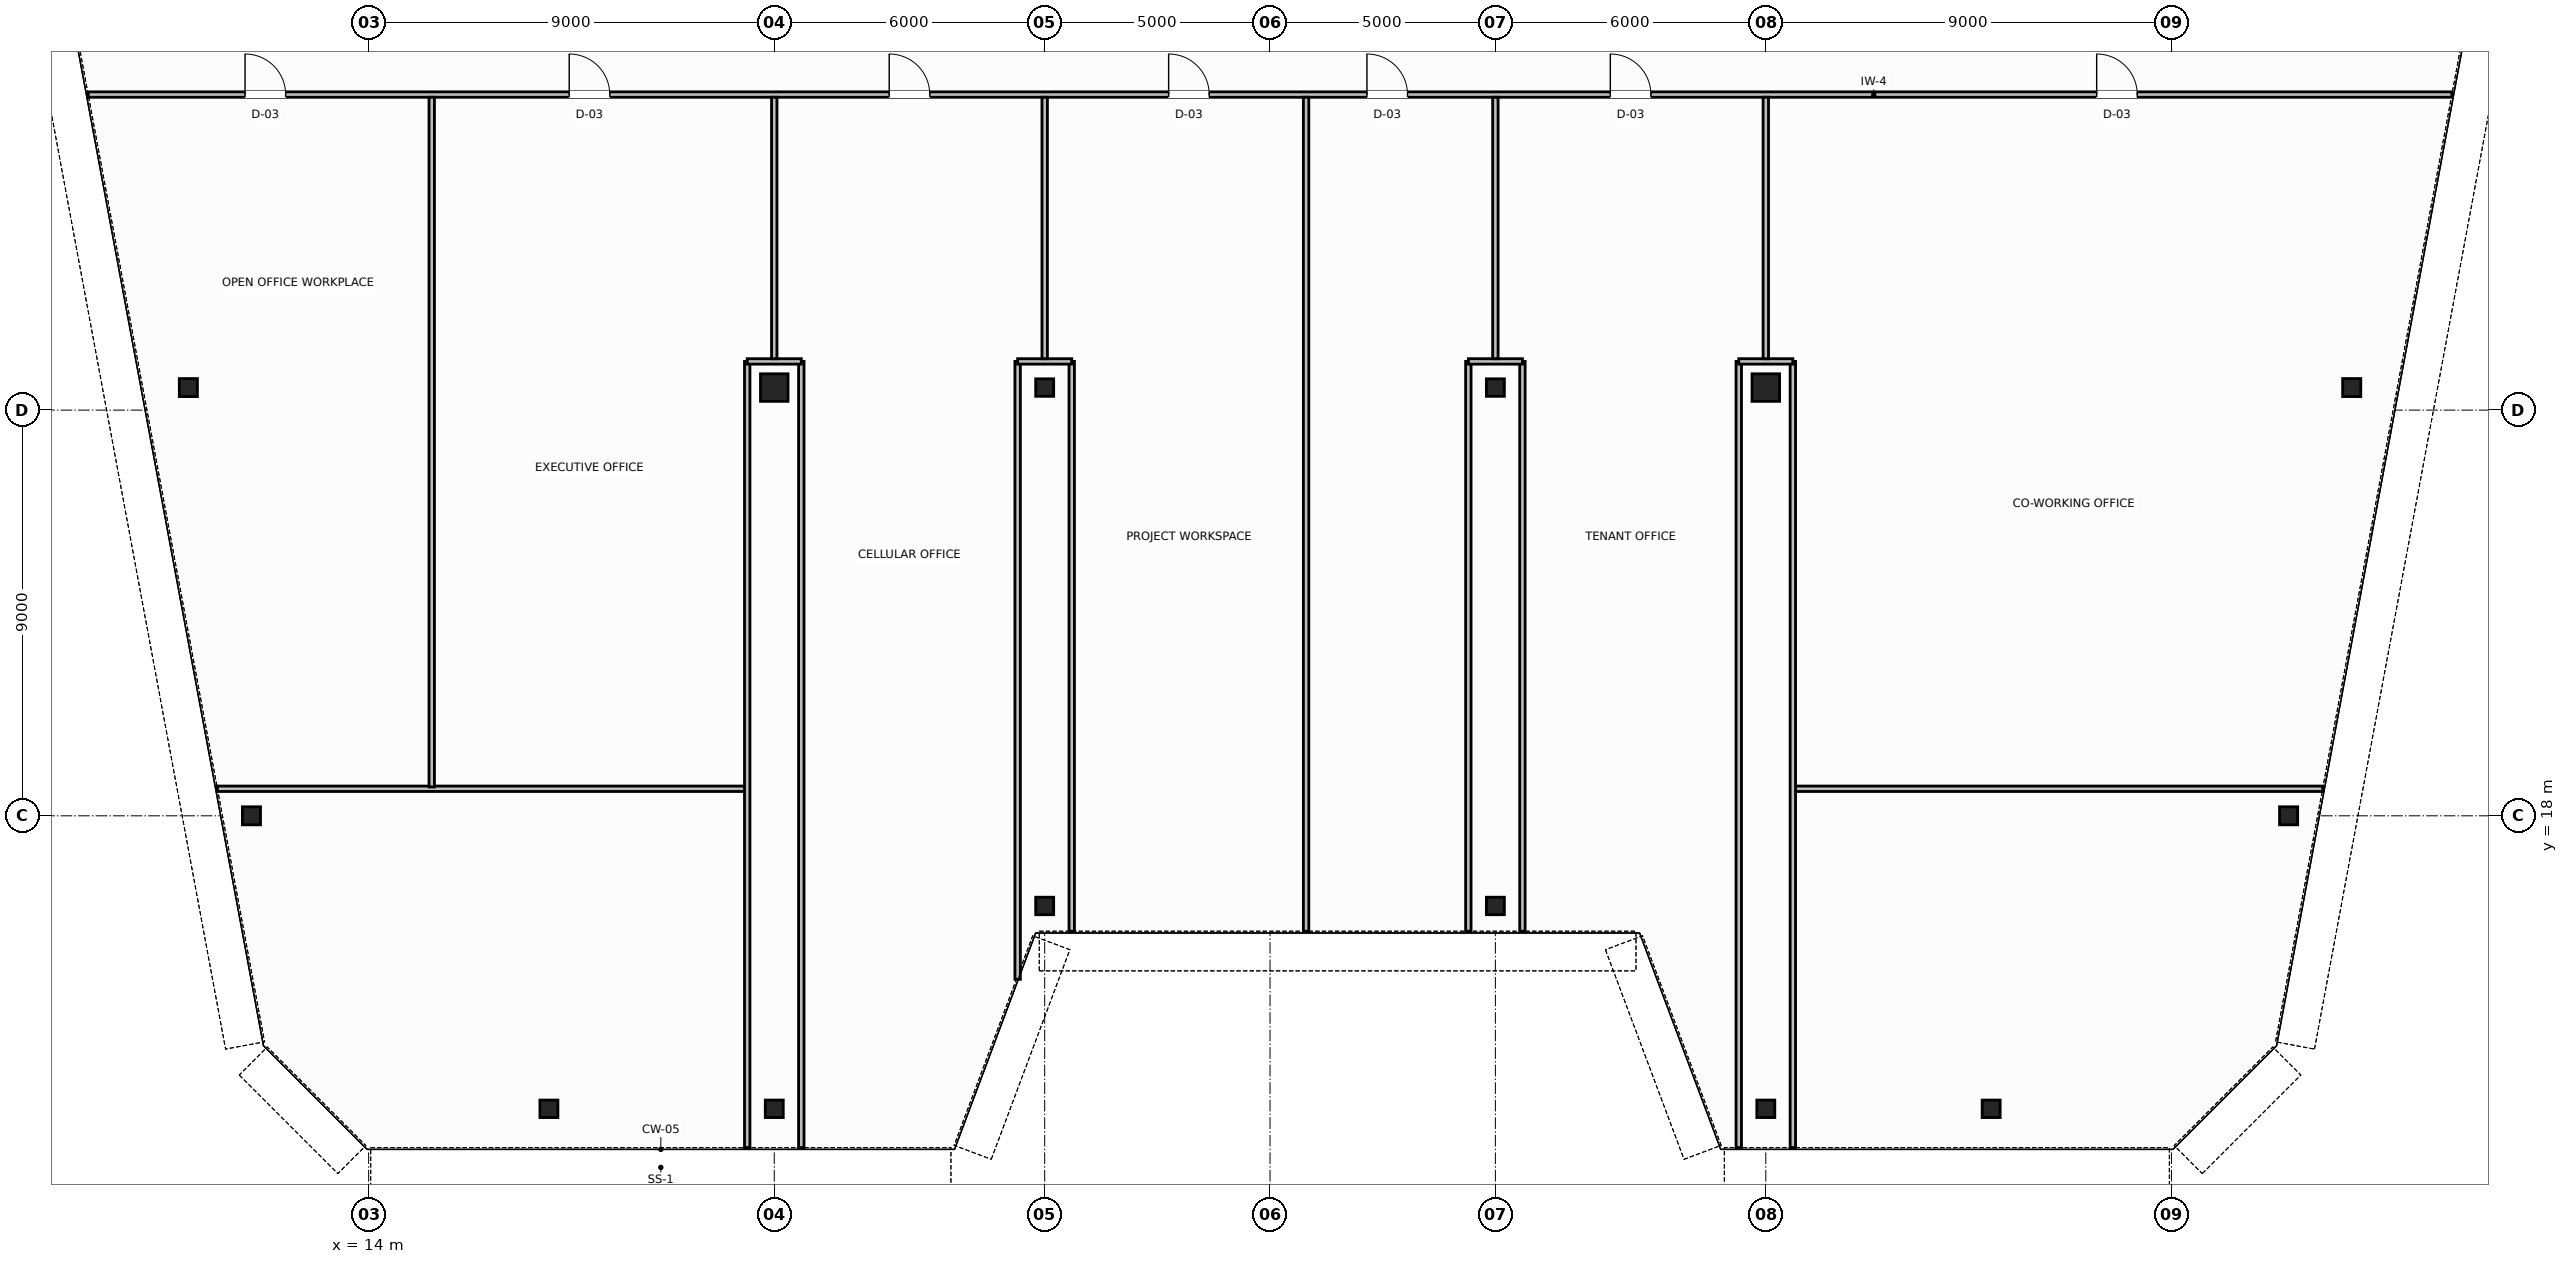
"""IFC4 building model, lengths in metres.
Left out: names, types, materials, properties, quantities, classifications, styles, units other than length and angle.
Written with IfcOpenShell. Run it as: python <this file> out.ifc"""

import sys

from ifc_helpers import new_model, si_unit, direction, frame, frame_2d, origin, origin_2d, place, context, subcontext, project, spatial, rectangle, hollow_circle, i_section, extrude, source, transform, mapped, element, fill, save


model = new_model("IFC4")
c1 = context("Model", 3, precision=1e-05, world=origin(), true_north=direction((0.0, 1.0)))
c2 = subcontext(c1, "Body", "Model", "MODEL_VIEW")
j1 = project(units=[si_unit("LENGTHUNIT", "METRE"), si_unit("PLANEANGLEUNIT", "RADIAN")], contexts=[c1])
p1 = place(None, origin())
s1 = spatial("IfcSite", under=j1, at=p1, CompositionType="ELEMENT")
p2 = place(p1, origin())
s2 = spatial("IfcBuilding", under=s1, at=p2, CompositionType="ELEMENT")
p3 = place(p2, frame((0.0, 0.0, 265.0)))
s3 = spatial("IfcBuildingStorey", under=s2, at=p3, CompositionType="ELEMENT", Elevation=265.0)
m1 = source(origin(), c2, "Body", "SweptSolid", [
    extrude(i_section(OverallWidth=0.401, OverallDepth=0.399, WebThickness=0.025, FlangeThickness=0.035, FilletRadius=0.015, at=origin_2d()), origin(), (0.0, 0.0, 1.0), 3.8),
])
for number, where, z_axis, x_axis in (
    (1, (10.0, 27.5, 0.0), (0.0, 0.0, 1.0), (1.0, 0.0, 0.0)),
    (2, (11.4, 18.0, 0.0), (0.0, 0.0, 1.0), (1.0, 0.0, 0.0)),
    (3, (58.0, 27.5, 0.0), (0.0, 0.0, 1.0), (1.0, 0.0, 0.0)),
    (4, (56.6, 18.0, 0.0), (0.0, 0.0, 1.0), (1.0, 0.0, 0.0)),
):
    element("IfcColumn", number, at=place(p3, frame(where, z_axis=z_axis, x_axis=x_axis)), inside=s3, PredefinedType="COLUMN", context=c2, shape_type="MappedRepresentation", body=[
        mapped(m1, transform((0.0, 0.0, 0.0), scale=1.0)),
    ])
m2 = source(origin(), c2, "Body", "SweptSolid", [
    extrude(hollow_circle(Radius=0.305, WallThickness=0.03, at=origin_2d()), origin(), (0.0, 0.0, 1.0), 3.8),
])
p4 = place(p3, frame((23.0, 27.5, 0.0), z_axis=(0.0, 0.0, 1.0), x_axis=(1.0, 0.0, 0.0)))
e5 = element("IfcColumn", 5, at=p4, inside=s3, PredefinedType="COLUMN", context=c2, shape_type="MappedRepresentation", body=[
    mapped(m2, transform((0.0, 0.0, 0.0), scale=1.0)),
])
m3 = source(origin(), c2, "Body", "SweptSolid", [
    extrude(i_section(OverallWidth=0.398, OverallDepth=0.387, WebThickness=0.021, FlangeThickness=0.029, FilletRadius=0.015, at=origin_2d()), origin(), (0.0, 0.0, 1.0), 3.8),
])
for number, where, z_axis, x_axis in (
    (6, (29.0, 27.5, 0.0), (0.0, 0.0, 1.0), (1.0, 0.0, 0.0)),
    (7, (39.0, 27.5, 0.0), (0.0, 0.0, 1.0), (1.0, 0.0, 0.0)),
):
    element("IfcColumn", number, at=place(p3, frame(where, z_axis=z_axis, x_axis=x_axis)), inside=s3, PredefinedType="COLUMN", context=c2, shape_type="MappedRepresentation", body=[
        mapped(m3, transform((0.0, 0.0, 0.0), scale=1.0)),
    ])
p5 = place(p3, frame((45.0, 27.5, 0.0), z_axis=(0.0, 0.0, 1.0), x_axis=(1.0, 0.0, 0.0)))
e8 = element("IfcColumn", 8, at=p5, inside=s3, PredefinedType="COLUMN", context=c2, shape_type="MappedRepresentation", body=[
    mapped(m2, transform((0.0, 0.0, 0.0), scale=1.0)),
])
for number, where, z_axis, x_axis in (
    (9, (18.0, 11.5, 0.0), (0.0, 0.0, 1.0), (1.0, 0.0, 0.0)),
    (10, (23.0, 11.5, 0.0), (0.0, 0.0, 1.0), (1.0, 0.0, 0.0)),
    (11, (29.0, 16.0, 0.0), (0.0, 0.0, 1.0), (1.0, 0.0, 0.0)),
    (12, (39.0, 16.0, 0.0), (0.0, 0.0, 1.0), (1.0, 0.0, 0.0)),
    (13, (45.0, 11.5, 0.0), (0.0, 0.0, 1.0), (1.0, 0.0, 0.0)),
    (14, (50.0, 11.5, 0.0), (0.0, 0.0, 1.0), (1.0, 0.0, 0.0)),
):
    element("IfcColumn", number, at=place(p3, frame(where, z_axis=z_axis, x_axis=x_axis)), inside=s3, PredefinedType="COLUMN", context=c2, shape_type="MappedRepresentation", body=[
        mapped(m3, transform((0.0, 0.0, 0.0), scale=1.0)),
    ])
p6 = place(p3, frame((7.777, 34.0, 0.0), z_axis=(0.0, 0.0, 1.0), x_axis=(1.0, 0.0, 0.0)))
e15 = element("IfcWall", 15, at=p6, inside=s3, PredefinedType="PARTITIONING", context=c2, shape_type="SweptSolid", body=[
    extrude(rectangle(XDim=52.446, YDim=0.12, at=frame_2d((26.223, 0.0))), origin(), (0.0, 0.0, 1.0), 3.58),
])
p7 = place(p6, frame((3.481, 0.0, 0.0)))
e16 = element("IfcOpeningElement", 16, at=p7, cuts=e15, PredefinedType="OPENING", context=c2, shape_type="SweptSolid", body=[
    extrude(rectangle(XDim=0.9, YDim=2.15, at=frame_2d((0.45, 1.075))), frame((0.0, 0.07, 0.0), z_axis=(0.0, -1.0, 0.0), x_axis=(1.0, 0.0, 0.0)), (0.0, 0.0, 1.0), 0.14),
])
p8 = place(p6, frame((10.673, 0.0, 0.0)))
e17 = element("IfcOpeningElement", 17, at=p8, cuts=e15, PredefinedType="OPENING", context=c2, shape_type="SweptSolid", body=[
    extrude(rectangle(XDim=0.9, YDim=2.15, at=frame_2d((0.45, 1.075))), frame((0.0, 0.07, 0.0), z_axis=(0.0, -1.0, 0.0), x_axis=(1.0, 0.0, 0.0)), (0.0, 0.0, 1.0), 0.14),
])
p9 = place(p6, frame((17.773, 0.0, 0.0)))
e18 = element("IfcOpeningElement", 18, at=p9, cuts=e15, PredefinedType="OPENING", context=c2, shape_type="SweptSolid", body=[
    extrude(rectangle(XDim=0.9, YDim=2.15, at=frame_2d((0.45, 1.075))), frame((0.0, 0.07, 0.0), z_axis=(0.0, -1.0, 0.0), x_axis=(1.0, 0.0, 0.0)), (0.0, 0.0, 1.0), 0.14),
])
p10 = place(p6, frame((23.973, 0.0, 0.0)))
e19 = element("IfcOpeningElement", 19, at=p10, cuts=e15, PredefinedType="OPENING", context=c2, shape_type="SweptSolid", body=[
    extrude(rectangle(XDim=0.9, YDim=2.15, at=frame_2d((0.45, 1.075))), frame((0.0, 0.07, 0.0), z_axis=(0.0, -1.0, 0.0), x_axis=(1.0, 0.0, 0.0)), (0.0, 0.0, 1.0), 0.14),
])
p11 = place(p6, frame((28.373, 0.0, 0.0)))
e20 = element("IfcOpeningElement", 20, at=p11, cuts=e15, PredefinedType="OPENING", context=c2, shape_type="SweptSolid", body=[
    extrude(rectangle(XDim=0.9, YDim=2.15, at=frame_2d((0.45, 1.075))), frame((0.0, 0.07, 0.0), z_axis=(0.0, -1.0, 0.0), x_axis=(1.0, 0.0, 0.0)), (0.0, 0.0, 1.0), 0.14),
])
p12 = place(p6, frame((33.773, 0.0, 0.0)))
e21 = element("IfcOpeningElement", 21, at=p12, cuts=e15, PredefinedType="OPENING", context=c2, shape_type="SweptSolid", body=[
    extrude(rectangle(XDim=0.9, YDim=2.15, at=frame_2d((0.45, 1.075))), frame((0.0, 0.07, 0.0), z_axis=(0.0, -1.0, 0.0), x_axis=(1.0, 0.0, 0.0)), (0.0, 0.0, 1.0), 0.14),
])
p13 = place(p6, frame((44.564, 0.0, 0.0)))
e22 = element("IfcOpeningElement", 22, at=p13, cuts=e15, PredefinedType="OPENING", context=c2, shape_type="SweptSolid", body=[
    extrude(rectangle(XDim=0.9, YDim=2.15, at=frame_2d((0.45, 1.075))), frame((0.0, 0.07, 0.0), z_axis=(0.0, -1.0, 0.0), x_axis=(1.0, 0.0, 0.0)), (0.0, 0.0, 1.0), 0.14),
])
for number, where, z_axis, x_axis in (
    (23, (10.645, 18.6, 0.0), (0.0, 0.0, 1.0), (1.0, 0.0, 0.0)),
    (24, (45.64, 18.6, 0.0), (0.0, 0.0, 1.0), (1.0, 0.0, 0.0)),
):
    element("IfcWall", number, at=place(p3, frame(where, z_axis=z_axis, x_axis=x_axis)), inside=s3, PredefinedType="PARTITIONING", context=c2, shape_type="SweptSolid", body=[
        extrude(rectangle(XDim=11.715, YDim=0.12, at=frame_2d((5.858, 0.0))), origin(), (0.0, 0.0, 1.0), 3.58),
    ])
for number, where, z_axis, x_axis in (
    (25, (22.4, 10.64, 0.0), (0.0, 0.0, 1.0), (0.0, 1.0, 0.0)),
    (26, (23.6, 10.64, 0.0), (0.0, 0.0, 1.0), (0.0, 1.0, 0.0)),
):
    element("IfcWall", number, at=place(p3, frame(where, z_axis=z_axis, x_axis=x_axis)), inside=s3, PredefinedType="PARTITIONING", context=c2, shape_type="SweptSolid", body=[
        extrude(rectangle(XDim=17.44, YDim=0.12, at=frame_2d((8.72, 0.0))), origin(), (0.0, 0.0, 1.0), 3.58),
    ])
p14 = place(p3, frame((22.4, 28.08, 0.0), z_axis=(0.0, 0.0, 1.0), x_axis=(1.0, 0.0, 0.0)))
e27 = element("IfcWall", 27, at=p14, inside=s3, PredefinedType="PARTITIONING", context=c2, shape_type="SweptSolid", body=[
    extrude(rectangle(XDim=1.2, YDim=0.12, at=frame_2d((0.6, 0.0))), origin(), (0.0, 0.0, 1.0), 3.58),
])
p15 = place(p3, frame((23.0, 28.14, 0.0), z_axis=(0.0, 0.0, 1.0), x_axis=(0.0, 1.0, 0.0)))
e28 = element("IfcWall", 28, at=p15, inside=s3, PredefinedType="PARTITIONING", context=c2, shape_type="SweptSolid", body=[
    extrude(rectangle(XDim=5.8, YDim=0.12, at=frame_2d((2.9, 0.0))), origin(), (0.0, 0.0, 1.0), 2.37),
])
p16 = place(p3, frame((28.4, 14.373, 0.0), z_axis=(0.0, 0.0, 1.0), x_axis=(0.0, 1.0, 0.0)))
e29 = element("IfcWall", 29, at=p16, inside=s3, PredefinedType="PARTITIONING", context=c2, shape_type="SweptSolid", body=[
    extrude(rectangle(XDim=13.707, YDim=0.12, at=frame_2d((6.854, 0.0))), origin(), (0.0, 0.0, 1.0), 3.58),
])
p17 = place(p3, frame((29.6, 15.44, 0.0), z_axis=(0.0, 0.0, 1.0), x_axis=(0.0, 1.0, 0.0)))
e30 = element("IfcWall", 30, at=p17, inside=s3, PredefinedType="PARTITIONING", context=c2, shape_type="SweptSolid", body=[
    extrude(rectangle(XDim=12.64, YDim=0.12, at=frame_2d((6.32, 0.0))), origin(), (0.0, 0.0, 1.0), 3.58),
])
p18 = place(p3, frame((28.4, 28.08, 0.0), z_axis=(0.0, 0.0, 1.0), x_axis=(1.0, 0.0, 0.0)))
e31 = element("IfcWall", 31, at=p18, inside=s3, PredefinedType="PARTITIONING", context=c2, shape_type="SweptSolid", body=[
    extrude(rectangle(XDim=1.2, YDim=0.12, at=frame_2d((0.6, 0.0))), origin(), (0.0, 0.0, 1.0), 3.58),
])
p19 = place(p3, frame((29.0, 28.14, 0.0), z_axis=(0.0, 0.0, 1.0), x_axis=(0.0, 1.0, 0.0)))
e32 = element("IfcWall", 32, at=p19, inside=s3, PredefinedType="PARTITIONING", context=c2, shape_type="SweptSolid", body=[
    extrude(rectangle(XDim=5.8, YDim=0.12, at=frame_2d((2.9, 0.0))), origin(), (0.0, 0.0, 1.0), 2.37),
])
for number, where, z_axis, x_axis in (
    (33, (38.4, 15.44, 0.0), (0.0, 0.0, 1.0), (0.0, 1.0, 0.0)),
    (34, (39.6, 15.44, 0.0), (0.0, 0.0, 1.0), (0.0, 1.0, 0.0)),
):
    element("IfcWall", number, at=place(p3, frame(where, z_axis=z_axis, x_axis=x_axis)), inside=s3, PredefinedType="PARTITIONING", context=c2, shape_type="SweptSolid", body=[
        extrude(rectangle(XDim=12.64, YDim=0.12, at=frame_2d((6.32, 0.0))), origin(), (0.0, 0.0, 1.0), 3.58),
    ])
p20 = place(p3, frame((38.4, 28.08, 0.0), z_axis=(0.0, 0.0, 1.0), x_axis=(1.0, 0.0, 0.0)))
e35 = element("IfcWall", 35, at=p20, inside=s3, PredefinedType="PARTITIONING", context=c2, shape_type="SweptSolid", body=[
    extrude(rectangle(XDim=1.2, YDim=0.12, at=frame_2d((0.6, 0.0))), origin(), (0.0, 0.0, 1.0), 3.58),
])
p21 = place(p3, frame((39.0, 28.14, 0.0), z_axis=(0.0, 0.0, 1.0), x_axis=(0.0, 1.0, 0.0)))
e36 = element("IfcWall", 36, at=p21, inside=s3, PredefinedType="PARTITIONING", context=c2, shape_type="SweptSolid", body=[
    extrude(rectangle(XDim=5.8, YDim=0.12, at=frame_2d((2.9, 0.0))), origin(), (0.0, 0.0, 1.0), 2.37),
])
for number, where, z_axis, x_axis in (
    (37, (44.4, 10.64, 0.0), (0.0, 0.0, 1.0), (0.0, 1.0, 0.0)),
    (38, (45.6, 10.64, 0.0), (0.0, 0.0, 1.0), (0.0, 1.0, 0.0)),
):
    element("IfcWall", number, at=place(p3, frame(where, z_axis=z_axis, x_axis=x_axis)), inside=s3, PredefinedType="PARTITIONING", context=c2, shape_type="SweptSolid", body=[
        extrude(rectangle(XDim=17.44, YDim=0.12, at=frame_2d((8.72, 0.0))), origin(), (0.0, 0.0, 1.0), 3.58),
    ])
p22 = place(p3, frame((44.4, 28.08, 0.0), z_axis=(0.0, 0.0, 1.0), x_axis=(1.0, 0.0, 0.0)))
e39 = element("IfcWall", 39, at=p22, inside=s3, PredefinedType="PARTITIONING", context=c2, shape_type="SweptSolid", body=[
    extrude(rectangle(XDim=1.2, YDim=0.12, at=frame_2d((0.6, 0.0))), origin(), (0.0, 0.0, 1.0), 3.58),
])
p23 = place(p3, frame((45.0, 28.14, 0.0), z_axis=(0.0, 0.0, 1.0), x_axis=(0.0, 1.0, 0.0)))
e40 = element("IfcWall", 40, at=p23, inside=s3, PredefinedType="PARTITIONING", context=c2, shape_type="SweptSolid", body=[
    extrude(rectangle(XDim=5.8, YDim=0.12, at=frame_2d((2.9, 0.0))), origin(), (0.0, 0.0, 1.0), 2.37),
])
p24 = place(p3, frame((15.4, 18.64, 0.0), z_axis=(0.0, 0.0, 1.0), x_axis=(0.0, 1.0, 0.0)))
e41 = element("IfcWall", 41, at=p24, inside=s3, PredefinedType="PARTITIONING", context=c2, shape_type="SweptSolid", body=[
    extrude(rectangle(XDim=15.3, YDim=0.12, at=frame_2d((7.65, 0.0))), origin(), (0.0, 0.0, 1.0), 3.58),
])
p25 = place(p3, frame((34.8, 15.44, 0.0), z_axis=(0.0, 0.0, 1.0), x_axis=(0.0, 1.0, 0.0)))
e42 = element("IfcWall", 42, at=p25, inside=s3, PredefinedType="PARTITIONING", context=c2, shape_type="SweptSolid", body=[
    extrude(rectangle(XDim=18.5, YDim=0.12, at=frame_2d((9.25, 0.0))), origin(), (0.0, 0.0, 1.0), 3.58),
])
m4 = source(origin(), c2, "Body", "SweptSolid", [
    extrude(rectangle(XDim=0.9, YDim=2.15, at=frame_2d((0.45, 1.075))), frame((0.0, 0.025, 0.0), z_axis=(0.0, -1.0, 0.0), x_axis=(1.0, 0.0, 0.0)), (0.0, 0.0, 1.0), 0.05),
])
p26 = place(p7, origin())
e43 = element("IfcDoor", 43, at=p26, inside=s3, OperationType="SINGLE_SWING_LEFT", PredefinedType="DOOR", context=c2, shape_type="MappedRepresentation", body=[
    mapped(m4, transform((0.0, 0.0, 0.0), scale=1.0)),
])
fill(e16, e43)
p27 = place(p8, origin())
e44 = element("IfcDoor", 44, at=p27, inside=s3, OperationType="SINGLE_SWING_RIGHT", PredefinedType="DOOR", context=c2, shape_type="MappedRepresentation", body=[
    mapped(m4, transform((0.0, 0.0, 0.0), scale=1.0)),
])
fill(e17, e44)
p28 = place(p9, origin())
e45 = element("IfcDoor", 45, at=p28, inside=s3, OperationType="SINGLE_SWING_LEFT", PredefinedType="DOOR", context=c2, shape_type="MappedRepresentation", body=[
    mapped(m4, transform((0.0, 0.0, 0.0), scale=1.0)),
])
fill(e18, e45)
p29 = place(p10, origin())
e46 = element("IfcDoor", 46, at=p29, inside=s3, OperationType="SINGLE_SWING_RIGHT", PredefinedType="DOOR", context=c2, shape_type="MappedRepresentation", body=[
    mapped(m4, transform((0.0, 0.0, 0.0), scale=1.0)),
])
fill(e19, e46)
p30 = place(p11, origin())
e47 = element("IfcDoor", 47, at=p30, inside=s3, OperationType="SINGLE_SWING_LEFT", PredefinedType="DOOR", context=c2, shape_type="MappedRepresentation", body=[
    mapped(m4, transform((0.0, 0.0, 0.0), scale=1.0)),
])
fill(e20, e47)
p31 = place(p12, origin())
e48 = element("IfcDoor", 48, at=p31, inside=s3, OperationType="SINGLE_SWING_RIGHT", PredefinedType="DOOR", context=c2, shape_type="MappedRepresentation", body=[
    mapped(m4, transform((0.0, 0.0, 0.0), scale=1.0)),
])
fill(e21, e48)
p32 = place(p13, origin())
e49 = element("IfcDoor", 49, at=p32, inside=s3, OperationType="SINGLE_SWING_LEFT", PredefinedType="DOOR", context=c2, shape_type="MappedRepresentation", body=[
    mapped(m4, transform((0.0, 0.0, 0.0), scale=1.0)),
])
fill(e22, e49)
save(model, sys.argv[1])
